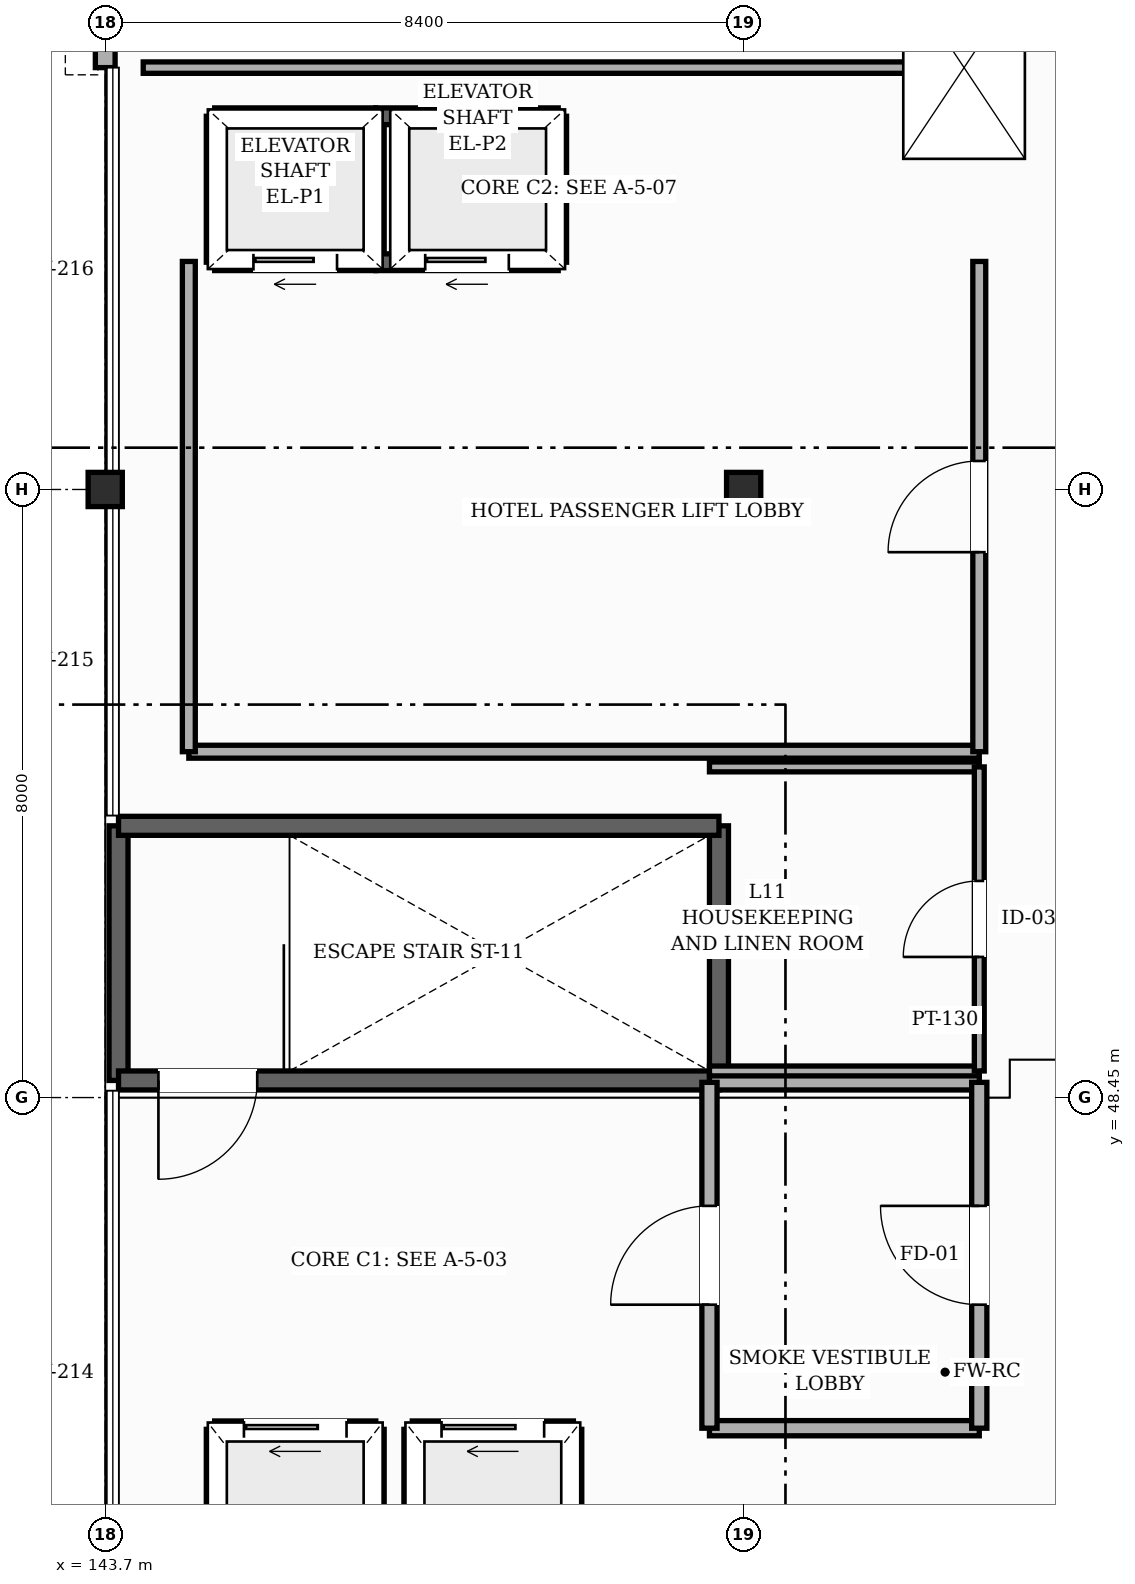
"""IFC4 building model, lengths in metres.
Left out: names, types, materials, properties, quantities, classifications, styles, units other than length and angle.
Written with IfcOpenShell. Run it as: python <this file> out.ifc"""

import sys

from ifc_helpers import new_model, si_unit, direction, frame, frame_2d, origin, origin_2d, place, context, subcontext, project, spatial, rectangle, hollow_rectangle, extrude, element, fill, save


model = new_model("IFC4")
c1 = context("Model", 3, precision=1e-05, world=origin(), true_north=direction((0.0, 1.0)))
c2 = subcontext(c1, "Body", "Model", "MODEL_VIEW")
j1 = project(units=[si_unit("LENGTHUNIT", "METRE"), si_unit("PLANEANGLEUNIT", "RADIAN")], contexts=[c1])
p1 = place(None, origin())
s1 = spatial("IfcSite", under=j1, at=p1, CompositionType="ELEMENT")
p2 = place(p1, origin())
s2 = spatial("IfcBuilding", under=s1, at=p2, CompositionType="ELEMENT")
p3 = place(p2, frame((0.0, 0.0, 46.2)))
s3 = spatial("IfcBuildingStorey", under=s2, at=p3, CompositionType="ELEMENT", Elevation=46.2)
for number, where, z_axis, x_axis in (
    (1, (143.7, 56.45, 0.0), (0.0, 0.0, 1.0), (1.0, 0.0, 0.0)),
    (2, (152.1, 56.45, 0.0), (0.0, 0.0, 1.0), (1.0, 0.0, 0.0)),
):
    element("IfcColumn", number, at=place(p3, frame(where, z_axis=z_axis, x_axis=x_axis)), inside=s3, PredefinedType="COLUMN", context=c2, shape_type="SweptSolid", body=[
        extrude(hollow_rectangle(XDim=0.45, YDim=0.45, WallThickness=0.019, InnerFilletRadius=0.019, OuterFilletRadius=0.038, at=origin_2d()), origin(), (0.0, 0.0, 1.0), 3.99),
    ])
p4 = place(p3, frame((143.7, 62.0, 0.0), z_axis=(0.0, 0.0, 1.0), x_axis=(0.0, 1.0, 0.0)))
e3 = element("IfcWall", 3, at=p4, inside=s3, PredefinedType="SOLIDWALL", context=c2, shape_type="SweptSolid", body=[
    extrude(rectangle(XDim=2.225, YDim=0.26, at=frame_2d((1.113, 0.0))), origin(), (0.0, 0.0, 1.0), 3.375),
])
p5 = place(p4, frame((0.285, 0.0, 0.85)))
e4 = element("IfcOpeningElement", 4, at=p5, cuts=e3, PredefinedType="OPENING", context=c2, shape_type="SweptSolid", body=[
    extrude(rectangle(XDim=1.65, YDim=1.65, at=frame_2d((0.825, 0.825))), frame((0.0, 0.14, 0.0), z_axis=(0.0, -1.0, 0.0), x_axis=(1.0, 0.0, 0.0)), (0.0, 0.0, 1.0), 0.28),
])
for number, where, z_axis, x_axis in (
    (5, (143.875, 48.675, 0.0), (0.0, 0.0, 1.0), (0.0, 1.0, 0.0)),
    (6, (151.775, 52.025, 0.0), (0.0, 0.0, 1.0), (0.0, -1.0, 0.0)),
):
    element("IfcWall", number, at=place(p3, frame(where, z_axis=z_axis, x_axis=x_axis)), inside=s3, PredefinedType="SHEAR", context=c2, shape_type="SweptSolid", body=[
        extrude(rectangle(XDim=3.35, YDim=0.25, at=frame_2d((1.675, 0.0))), origin(), (0.0, 0.0, 1.0), 3.95),
    ])
p6 = place(p3, frame((151.775, 48.675, 0.0), z_axis=(0.0, 0.0, 1.0), x_axis=(-1.0, 0.0, 0.0)))
e7 = element("IfcWall", 7, at=p6, inside=s3, PredefinedType="SHEAR", context=c2, shape_type="SweptSolid", body=[
    extrude(rectangle(XDim=7.9, YDim=0.25, at=frame_2d((3.95, 0.0))), origin(), (0.0, 0.0, 1.0), 3.95),
])
p7 = place(p6, frame((6.075, 0.0, 0.0)))
e8 = element("IfcOpeningElement", 8, at=p7, cuts=e7, PredefinedType="OPENING", context=c2, shape_type="SweptSolid", body=[
    extrude(rectangle(XDim=1.3, YDim=2.2, at=frame_2d((0.65, 1.1))), frame((0.0, 0.135, 0.0), z_axis=(0.0, -1.0, 0.0), x_axis=(1.0, 0.0, 0.0)), (0.0, 0.0, 1.0), 0.27),
])
p8 = place(p3, frame((143.875, 52.025, 0.0), z_axis=(0.0, 0.0, 1.0), x_axis=(1.0, 0.0, 0.0)))
e9 = element("IfcWall", 9, at=p8, inside=s3, PredefinedType="SHEAR", context=c2, shape_type="SweptSolid", body=[
    extrude(rectangle(XDim=7.9, YDim=0.25, at=frame_2d((3.95, 0.0))), origin(), (0.0, 0.0, 1.0), 3.95),
])
p9 = place(p3, frame((145.14, 44.085, 0.0), z_axis=(0.0, 0.0, 1.0), x_axis=(1.0, 0.0, 0.0)))
e10 = element("IfcWall", 10, at=p9, inside=s3, PredefinedType="SHEAR", context=c2, shape_type="SweptSolid", body=[
    extrude(rectangle(XDim=2.12, YDim=0.22, at=frame_2d((1.06, 0.0))), origin(), (0.0, 0.0, 1.0), 3.95),
])
p10 = place(p9, frame((0.385, 0.0, 0.0)))
e11 = element("IfcOpeningElement", 11, at=p10, cuts=e10, PredefinedType="OPENING", context=c2, shape_type="SweptSolid", body=[
    extrude(rectangle(XDim=1.35, YDim=2.3, at=frame_2d((0.675, 1.15))), frame((0.0, 0.12, 0.0), z_axis=(0.0, -1.0, 0.0), x_axis=(1.0, 0.0, 0.0)), (0.0, 0.0, 1.0), 0.24),
])
for number, where, z_axis, x_axis in (
    (12, (147.26, 41.315, 0.0), (0.0, 0.0, 1.0), (0.0, 1.0, 0.0)),
    (13, (145.14, 41.315, 0.0), (0.0, 0.0, 1.0), (0.0, 1.0, 0.0)),
):
    element("IfcWall", number, at=place(p3, frame(where, z_axis=z_axis, x_axis=x_axis)), inside=s3, PredefinedType="SHEAR", context=c2, shape_type="SweptSolid", body=[
        extrude(rectangle(XDim=2.77, YDim=0.22, at=frame_2d((1.385, 0.0))), origin(), (0.0, 0.0, 1.0), 3.95),
    ])
p11 = place(p3, frame((147.74, 44.085, 0.0), z_axis=(0.0, 0.0, 1.0), x_axis=(1.0, 0.0, 0.0)))
e14 = element("IfcWall", 14, at=p11, inside=s3, PredefinedType="SHEAR", context=c2, shape_type="SweptSolid", body=[
    extrude(rectangle(XDim=2.12, YDim=0.22, at=frame_2d((1.06, 0.0))), origin(), (0.0, 0.0, 1.0), 3.95),
])
p12 = place(p11, frame((0.385, 0.0, 0.0)))
e15 = element("IfcOpeningElement", 15, at=p12, cuts=e14, PredefinedType="OPENING", context=c2, shape_type="SweptSolid", body=[
    extrude(rectangle(XDim=1.35, YDim=2.3, at=frame_2d((0.675, 1.15))), frame((0.0, 0.12, 0.0), z_axis=(0.0, -1.0, 0.0), x_axis=(1.0, 0.0, 0.0)), (0.0, 0.0, 1.0), 0.24),
])
for number, where, z_axis, x_axis in (
    (16, (149.86, 41.315, 0.0), (0.0, 0.0, 1.0), (0.0, 1.0, 0.0)),
    (17, (147.74, 41.315, 0.0), (0.0, 0.0, 1.0), (0.0, 1.0, 0.0)),
):
    element("IfcWall", number, at=place(p3, frame(where, z_axis=z_axis, x_axis=x_axis)), inside=s3, PredefinedType="SHEAR", context=c2, shape_type="SweptSolid", body=[
        extrude(rectangle(XDim=2.77, YDim=0.22, at=frame_2d((1.385, 0.0))), origin(), (0.0, 0.0, 1.0), 3.95),
    ])
p13 = place(p3, frame((145.14, 61.36, 0.0), z_axis=(0.0, 0.0, 1.0), x_axis=(1.0, 0.0, 0.0)))
e18 = element("IfcWall", 18, at=p13, inside=s3, PredefinedType="SHEAR", context=c2, shape_type="SweptSolid", body=[
    extrude(rectangle(XDim=2.12, YDim=0.22, at=frame_2d((1.06, 0.0))), origin(), (0.0, 0.0, 1.0), 3.95),
])
p14 = place(p3, frame((145.14, 59.44, 0.0), z_axis=(0.0, 0.0, 1.0), x_axis=(1.0, 0.0, 0.0)))
e19 = element("IfcWall", 19, at=p14, inside=s3, PredefinedType="SHEAR", context=c2, shape_type="SweptSolid", body=[
    extrude(rectangle(XDim=2.12, YDim=0.22, at=frame_2d((1.06, 0.0))), origin(), (0.0, 0.0, 1.0), 3.95),
])
p15 = place(p14, frame((0.51, 0.0, 0.0)))
e20 = element("IfcOpeningElement", 20, at=p15, cuts=e19, PredefinedType="OPENING", context=c2, shape_type="SweptSolid", body=[
    extrude(rectangle(XDim=1.1, YDim=2.2, at=frame_2d((0.55, 1.1))), frame((0.0, 0.12, 0.0), z_axis=(0.0, -1.0, 0.0), x_axis=(1.0, 0.0, 0.0)), (0.0, 0.0, 1.0), 0.24),
])
for number, where, z_axis, x_axis in (
    (21, (147.26, 59.44, 0.0), (0.0, 0.0, 1.0), (0.0, 1.0, 0.0)),
    (22, (145.14, 59.44, 0.0), (0.0, 0.0, 1.0), (0.0, 1.0, 0.0)),
):
    element("IfcWall", number, at=place(p3, frame(where, z_axis=z_axis, x_axis=x_axis)), inside=s3, PredefinedType="SHEAR", context=c2, shape_type="SweptSolid", body=[
        extrude(rectangle(XDim=1.92, YDim=0.22, at=frame_2d((0.96, 0.0))), origin(), (0.0, 0.0, 1.0), 3.95),
    ])
p16 = place(p3, frame((147.26, 61.36, 0.0), z_axis=(0.0, 0.0, 1.0), x_axis=(1.0, 0.0, 0.0)))
e23 = element("IfcWall", 23, at=p16, inside=s3, PredefinedType="SHEAR", context=c2, shape_type="SweptSolid", body=[
    extrude(rectangle(XDim=2.4, YDim=0.22, at=frame_2d((1.2, 0.0))), origin(), (0.0, 0.0, 1.0), 3.95),
])
p17 = place(p3, frame((147.26, 59.44, 0.0), z_axis=(0.0, 0.0, 1.0), x_axis=(1.0, 0.0, 0.0)))
e24 = element("IfcWall", 24, at=p17, inside=s3, PredefinedType="SHEAR", context=c2, shape_type="SweptSolid", body=[
    extrude(rectangle(XDim=2.4, YDim=0.22, at=frame_2d((1.2, 0.0))), origin(), (0.0, 0.0, 1.0), 3.95),
])
p18 = place(p17, frame((0.65, 0.0, 0.0)))
e25 = element("IfcOpeningElement", 25, at=p18, cuts=e24, PredefinedType="OPENING", context=c2, shape_type="SweptSolid", body=[
    extrude(rectangle(XDim=1.1, YDim=2.2, at=frame_2d((0.55, 1.1))), frame((0.0, 0.12, 0.0), z_axis=(0.0, -1.0, 0.0), x_axis=(1.0, 0.0, 0.0)), (0.0, 0.0, 1.0), 0.24),
])
p19 = place(p3, frame((149.66, 59.44, 0.0), z_axis=(0.0, 0.0, 1.0), x_axis=(0.0, 1.0, 0.0)))
e26 = element("IfcWall", 26, at=p19, inside=s3, PredefinedType="SHEAR", context=c2, shape_type="SweptSolid", body=[
    extrude(rectangle(XDim=1.92, YDim=0.22, at=frame_2d((0.96, 0.0))), origin(), (0.0, 0.0, 1.0), 3.95),
])
for number, where, z_axis, x_axis in (
    (27, (151.65, 44.1, 0.0), (0.0, 0.0, 1.0), (1.0, 0.0, 0.0)),
    (28, (151.65, 48.65, 0.0), (0.0, 0.0, 1.0), (1.0, 0.0, 0.0)),
):
    element("IfcWall", number, at=place(p3, frame(where, z_axis=z_axis, x_axis=x_axis)), inside=s3, PredefinedType="SOLIDWALL", context=c2, shape_type="SweptSolid", body=[
        extrude(rectangle(XDim=3.55, YDim=0.2, at=frame_2d((1.775, 0.0))), origin(), (0.0, 0.0, 1.0), 3.935),
    ])
for number, where, z_axis, x_axis in (
    (29, (151.65, 48.8, 0.0), (0.0, 0.0, 1.0), (1.0, 0.0, 0.0)),
    (30, (151.65, 52.8, 0.0), (0.0, 0.0, 1.0), (1.0, 0.0, 0.0)),
):
    element("IfcWall", number, at=place(p3, frame(where, z_axis=z_axis, x_axis=x_axis)), inside=s3, PredefinedType="PARTITIONING", context=c2, shape_type="SweptSolid", body=[
        extrude(rectangle(XDim=3.55, YDim=0.13, at=frame_2d((1.775, 0.0))), origin(), (0.0, 0.0, 1.0), 3.935),
    ])
p20 = place(p3, frame((144.8, 53.0, 0.0), z_axis=(0.0, 0.0, 1.0), x_axis=(1.0, 0.0, 0.0)))
e31 = element("IfcWall", 31, at=p20, inside=s3, PredefinedType="PARTITIONING", context=c2, shape_type="SweptSolid", body=[
    extrude(rectangle(XDim=10.4, YDim=0.17, at=frame_2d((5.2, 0.0))), origin(), (0.0, 0.0, 1.0), 3.935),
])
p21 = place(p3, frame((144.2, 62.0, 0.0), z_axis=(0.0, 0.0, 1.0), x_axis=(1.0, 0.0, 0.0)))
e32 = element("IfcWall", 32, at=p21, inside=s3, PredefinedType="PARTITIONING", context=c2, shape_type="SweptSolid", body=[
    extrude(rectangle(XDim=11.0, YDim=0.15, at=frame_2d((5.5, 0.0))), origin(), (0.0, 0.0, 1.0), 3.935),
])
p22 = place(p3, frame((144.8, 53.0, 0.0), z_axis=(0.0, 0.0, 1.0), x_axis=(0.0, 1.0, 0.0)))
e33 = element("IfcWall", 33, at=p22, inside=s3, PredefinedType="PARTITIONING", context=c2, shape_type="SweptSolid", body=[
    extrude(rectangle(XDim=6.45, YDim=0.17, at=frame_2d((3.225, 0.0))), origin(), (0.0, 0.0, 1.0), 3.935),
])
p23 = place(p3, frame((151.65, 44.1, 0.0), z_axis=(0.0, 0.0, 1.0), x_axis=(0.0, 1.0, 0.0)))
e34 = element("IfcWall", 34, at=p23, inside=s3, PredefinedType="SOLIDWALL", context=c2, shape_type="SweptSolid", body=[
    extrude(rectangle(XDim=4.55, YDim=0.2, at=frame_2d((2.275, 0.0))), origin(), (0.0, 0.0, 1.0), 3.935),
])
p24 = place(p23, frame((1.625, 0.0, 0.0)))
e35 = element("IfcOpeningElement", 35, at=p24, cuts=e34, PredefinedType="OPENING", context=c2, shape_type="SweptSolid", body=[
    extrude(rectangle(XDim=1.3, YDim=2.2, at=frame_2d((0.65, 1.1))), frame((0.0, 0.11, 0.0), z_axis=(0.0, -1.0, 0.0), x_axis=(1.0, 0.0, 0.0)), (0.0, 0.0, 1.0), 0.22),
])
p25 = place(p3, frame((155.2, 44.1, 0.0), z_axis=(0.0, 0.0, 1.0), x_axis=(0.0, 1.0, 0.0)))
e36 = element("IfcWall", 36, at=p25, inside=s3, PredefinedType="SOLIDWALL", context=c2, shape_type="SweptSolid", body=[
    extrude(rectangle(XDim=4.55, YDim=0.2, at=frame_2d((2.275, 0.0))), origin(), (0.0, 0.0, 1.0), 3.935),
])
p26 = place(p25, frame((1.625, 0.0, 0.0)))
e37 = element("IfcOpeningElement", 37, at=p26, cuts=e36, PredefinedType="OPENING", context=c2, shape_type="SweptSolid", body=[
    extrude(rectangle(XDim=1.3, YDim=2.2, at=frame_2d((0.65, 1.1))), frame((0.0, 0.11, 0.0), z_axis=(0.0, -1.0, 0.0), x_axis=(1.0, 0.0, 0.0)), (0.0, 0.0, 1.0), 0.22),
])
p27 = place(p3, frame((155.2, 48.8, 0.0), z_axis=(0.0, 0.0, 1.0), x_axis=(0.0, 1.0, 0.0)))
e38 = element("IfcWall", 38, at=p27, inside=s3, PredefinedType="PARTITIONING", context=c2, shape_type="SweptSolid", body=[
    extrude(rectangle(XDim=4.0, YDim=0.13, at=frame_2d((2.0, 0.0))), origin(), (0.0, 0.0, 1.0), 3.935),
])
p28 = place(p27, frame((1.5, 0.0, 0.0)))
e39 = element("IfcOpeningElement", 39, at=p28, cuts=e38, PredefinedType="OPENING", context=c2, shape_type="SweptSolid", body=[
    extrude(rectangle(XDim=1.0, YDim=2.18, at=frame_2d((0.5, 1.09))), frame((0.0, 0.075, 0.0), z_axis=(0.0, -1.0, 0.0), x_axis=(1.0, 0.0, 0.0)), (0.0, 0.0, 1.0), 0.15),
])
p29 = place(p3, frame((155.2, 53.0, 0.0), z_axis=(0.0, 0.0, 1.0), x_axis=(0.0, 1.0, 0.0)))
e40 = element("IfcWall", 40, at=p29, inside=s3, PredefinedType="PARTITIONING", context=c2, shape_type="SweptSolid", body=[
    extrude(rectangle(XDim=6.45, YDim=0.17, at=frame_2d((3.225, 0.0))), origin(), (0.0, 0.0, 1.0), 3.935),
])
p30 = place(p29, frame((2.625, 0.0, 0.0)))
e41 = element("IfcOpeningElement", 41, at=p30, cuts=e40, PredefinedType="OPENING", context=c2, shape_type="SweptSolid", body=[
    extrude(rectangle(XDim=1.2, YDim=2.2, at=frame_2d((0.6, 1.1))), frame((0.0, 0.095, 0.0), z_axis=(0.0, -1.0, 0.0), x_axis=(1.0, 0.0, 0.0)), (0.0, 0.0, 1.0), 0.19),
])
p31 = place(p3, frame((155.2, 62.0, 0.0), z_axis=(0.0, 0.0, 1.0), x_axis=(0.0, 1.0, 0.0)))
e42 = element("IfcWall", 42, at=p31, inside=s3, PredefinedType="PARTITIONING", context=c2, shape_type="SweptSolid", body=[
    extrude(rectangle(XDim=18.2, YDim=0.15, at=frame_2d((9.1, 0.0))), origin(), (0.0, 0.0, 1.0), 3.935),
])
p32 = place(p31, frame((0.675, 0.0, 0.0)))
e43 = element("IfcOpeningElement", 43, at=p32, cuts=e42, PredefinedType="OPENING", context=c2, shape_type="SweptSolid", body=[
    extrude(rectangle(XDim=1.1, YDim=2.2, at=frame_2d((0.55, 1.1))), frame((0.0, 0.085, 0.0), z_axis=(0.0, -1.0, 0.0), x_axis=(1.0, 0.0, 0.0)), (0.0, 0.0, 1.0), 0.17),
])
p33 = place(p31, frame((5.225, 0.0, 0.0)))
e44 = element("IfcOpeningElement", 44, at=p33, cuts=e42, PredefinedType="OPENING", context=c2, shape_type="SweptSolid", body=[
    extrude(rectangle(XDim=1.1, YDim=2.2, at=frame_2d((0.55, 1.1))), frame((0.0, 0.085, 0.0), z_axis=(0.0, -1.0, 0.0), x_axis=(1.0, 0.0, 0.0)), (0.0, 0.0, 1.0), 0.17),
])
p34 = place(p31, frame((9.775, 0.0, 0.0)))
e45 = element("IfcOpeningElement", 45, at=p34, cuts=e42, PredefinedType="OPENING", context=c2, shape_type="SweptSolid", body=[
    extrude(rectangle(XDim=1.1, YDim=2.2, at=frame_2d((0.55, 1.1))), frame((0.0, 0.085, 0.0), z_axis=(0.0, -1.0, 0.0), x_axis=(1.0, 0.0, 0.0)), (0.0, 0.0, 1.0), 0.17),
])
p35 = place(p31, frame((14.325, 0.0, 0.0)))
e46 = element("IfcOpeningElement", 46, at=p35, cuts=e42, PredefinedType="OPENING", context=c2, shape_type="SweptSolid", body=[
    extrude(rectangle(XDim=1.1, YDim=2.2, at=frame_2d((0.55, 1.1))), frame((0.0, 0.085, 0.0), z_axis=(0.0, -1.0, 0.0), x_axis=(1.0, 0.0, 0.0)), (0.0, 0.0, 1.0), 0.17),
])
p36 = place(p2, frame((0.0, 0.0, 50.4)))
p37 = place(p36, frame((0.0, 0.0, -0.21)))
p38 = place(p37, frame((155.0, 62.0, 0.0)))
p39 = place(p38, frame((0.0, 0.0, 0.16)))
e47 = element("IfcWindow", 47, at=p39, inside=s3, PartitioningType="SINGLE_PANEL", PredefinedType="SKYLIGHT", context=c2, shape_type="SweptSolid", body=[
    extrude(rectangle(XDim=1.6, YDim=2.4, at=origin_2d()), origin(), (0.0, 0.0, 1.0), 0.05),
])
p40 = place(p7, origin())
e48 = element("IfcDoor", 48, at=p40, inside=s3, OperationType="SINGLE_SWING_RIGHT", PredefinedType="DOOR", context=c2, shape_type="SweptSolid", body=[
    extrude(rectangle(XDim=1.3, YDim=2.2, at=frame_2d((0.65, 1.1))), frame((0.0, 0.025, 0.0), z_axis=(0.0, -1.0, 0.0), x_axis=(1.0, 0.0, 0.0)), (0.0, 0.0, 1.0), 0.05),
])
fill(e8, e48)
p41 = place(p10, origin())
e49 = element("IfcDoor", 49, at=p41, inside=s3, OperationType="SLIDING_TO_LEFT", PredefinedType="DOOR", context=c2, shape_type="SweptSolid", body=[
    extrude(rectangle(XDim=1.35, YDim=2.3, at=frame_2d((0.675, 1.15))), frame((0.0, 0.025, 0.0), z_axis=(0.0, -1.0, 0.0), x_axis=(1.0, 0.0, 0.0)), (0.0, 0.0, 1.0), 0.05),
])
fill(e11, e49)
p42 = place(p12, origin())
e50 = element("IfcDoor", 50, at=p42, inside=s3, OperationType="SLIDING_TO_LEFT", PredefinedType="DOOR", context=c2, shape_type="SweptSolid", body=[
    extrude(rectangle(XDim=1.35, YDim=2.3, at=frame_2d((0.675, 1.15))), frame((0.0, 0.025, 0.0), z_axis=(0.0, -1.0, 0.0), x_axis=(1.0, 0.0, 0.0)), (0.0, 0.0, 1.0), 0.05),
])
fill(e15, e50)
p43 = place(p15, origin())
e51 = element("IfcDoor", 51, at=p43, inside=s3, OperationType="SLIDING_TO_LEFT", PredefinedType="DOOR", context=c2, shape_type="SweptSolid", body=[
    extrude(rectangle(XDim=1.1, YDim=2.2, at=frame_2d((0.55, 1.1))), frame((0.0, 0.025, 0.0), z_axis=(0.0, -1.0, 0.0), x_axis=(1.0, 0.0, 0.0)), (0.0, 0.0, 1.0), 0.05),
])
fill(e20, e51)
p44 = place(p18, origin())
e52 = element("IfcDoor", 52, at=p44, inside=s3, OperationType="SLIDING_TO_LEFT", PredefinedType="DOOR", context=c2, shape_type="SweptSolid", body=[
    extrude(rectangle(XDim=1.1, YDim=2.2, at=frame_2d((0.55, 1.1))), frame((0.0, 0.025, 0.0), z_axis=(0.0, -1.0, 0.0), x_axis=(1.0, 0.0, 0.0)), (0.0, 0.0, 1.0), 0.05),
])
fill(e25, e52)
p45 = place(p24, origin())
e53 = element("IfcDoor", 53, at=p45, inside=s3, OperationType="SINGLE_SWING_LEFT", PredefinedType="DOOR", context=c2, shape_type="SweptSolid", body=[
    extrude(rectangle(XDim=1.3, YDim=2.2, at=frame_2d((0.65, 1.1))), frame((0.0, 0.025, 0.0), z_axis=(0.0, -1.0, 0.0), x_axis=(1.0, 0.0, 0.0)), (0.0, 0.0, 1.0), 0.05),
])
fill(e35, e53)
p46 = place(p26, origin())
e54 = element("IfcDoor", 54, at=p46, inside=s3, OperationType="SINGLE_SWING_RIGHT", PredefinedType="DOOR", context=c2, shape_type="SweptSolid", body=[
    extrude(rectangle(XDim=1.3, YDim=2.2, at=frame_2d((0.65, 1.1))), frame((0.0, 0.025, 0.0), z_axis=(0.0, -1.0, 0.0), x_axis=(1.0, 0.0, 0.0)), (0.0, 0.0, 1.0), 0.05),
])
fill(e37, e54)
p47 = place(p30, origin())
e55 = element("IfcDoor", 55, at=p47, inside=s3, OperationType="SINGLE_SWING_LEFT", PredefinedType="DOOR", context=c2, shape_type="SweptSolid", body=[
    extrude(rectangle(XDim=1.2, YDim=2.2, at=frame_2d((0.6, 1.1))), frame((0.0, 0.025, 0.0), z_axis=(0.0, -1.0, 0.0), x_axis=(1.0, 0.0, 0.0)), (0.0, 0.0, 1.0), 0.05),
])
fill(e41, e55)
p48 = place(p28, origin())
e56 = element("IfcDoor", 56, at=p48, inside=s3, OperationType="SINGLE_SWING_LEFT", PredefinedType="DOOR", context=c2, shape_type="SweptSolid", body=[
    extrude(rectangle(XDim=1.0, YDim=2.18, at=frame_2d((0.5, 1.09))), frame((0.0, 0.025, 0.0), z_axis=(0.0, -1.0, 0.0), x_axis=(1.0, 0.0, 0.0)), (0.0, 0.0, 1.0), 0.05),
])
fill(e39, e56)
save(model, sys.argv[1])
